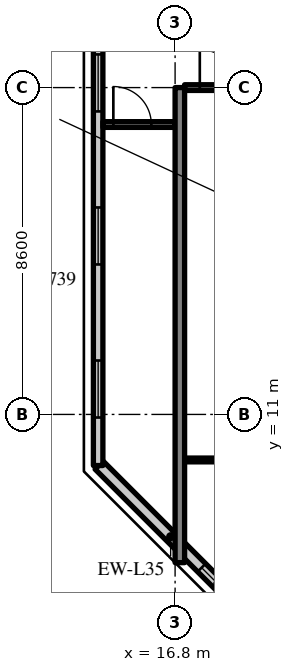
"""IFC4 building model, lengths in metres.
Left out: names, types, materials, properties, quantities, classifications, styles, units other than length and angle.
Written with IfcOpenShell. Run it as: python <this file> out.ifc"""

import sys

from ifc_helpers import new_model, si_unit, direction, frame, frame_2d, origin, place, context, subcontext, project, spatial, rectangle, extrude, source, transform, mapped, element, fill, save


model = new_model("IFC4")
c1 = context("Model", 3, precision=1e-05, world=origin(), true_north=direction((0.0, 1.0)))
c2 = subcontext(c1, "Body", "Model", "MODEL_VIEW")
j1 = project(units=[si_unit("LENGTHUNIT", "METRE"), si_unit("PLANEANGLEUNIT", "RADIAN")], contexts=[c1])
p1 = place(None, origin())
s1 = spatial("IfcSite", under=j1, at=p1, CompositionType="ELEMENT")
p2 = place(p1, origin())
s2 = spatial("IfcBuilding", under=s1, at=p2, CompositionType="ELEMENT")
p3 = place(p2, frame((0.0, 0.0, 281.7)))
s3 = spatial("IfcBuildingStorey", under=s2, at=p3, CompositionType="ELEMENT", Elevation=281.7)
m1 = source(origin(), c2, "Body", "SweptSolid", [
    extrude(rectangle(XDim=12.5, YDim=0.25, at=frame_2d((6.25, 0.0))), origin(), (0.0, 0.0, 1.0), 3.72),
])
p4 = place(p3, frame((16.925, 7.1, 0.0), z_axis=(0.0, 0.0, 1.0), x_axis=(0.0, 1.0, 0.0)))
e1 = element("IfcWall", 1, at=p4, inside=s3, PredefinedType="SHEAR", context=c2, shape_type="MappedRepresentation", body=[
    mapped(m1, transform((0.0, 0.0, 0.0), scale=1.0)),
])
m2 = source(origin(), c2, "Body", "SweptSolid", [
    extrude(rectangle(XDim=5.326, YDim=0.3, at=frame_2d((2.663, 0.0))), origin(), (0.0, 0.0, 1.0), 3.72),
])
p5 = place(p3, frame((14.8, 9.666, 0.0), z_axis=(0.0, 0.0, 1.0), x_axis=(0.707083859269, -0.707129702361, 0.0)))
e2 = element("IfcWall", 2, at=p5, inside=s3, PredefinedType="SOLIDWALL", context=c2, shape_type="MappedRepresentation", body=[
    mapped(m2, transform((0.0, 0.0, 0.0), scale=1.0)),
])
m3 = source(origin(), c2, "Body", "SweptSolid", [
    extrude(rectangle(XDim=1.2, YDim=1.5, at=frame_2d((0.6, 0.75))), frame((0.0, 0.16, 0.0), z_axis=(0.0, -1.0, 0.0), x_axis=(1.0, 0.0, 0.0)), (0.0, 0.0, 1.0), 0.32),
])
p6 = place(p5, frame((3.815, 0.0, 0.9)))
e3 = element("IfcOpeningElement", 3, at=p6, cuts=e2, PredefinedType="OPENING", context=c2, shape_type="MappedRepresentation", body=[
    mapped(m3, transform((0.0, 0.0, 0.0), scale=1.0)),
])
m4 = source(origin(), c2, "Body", "SweptSolid", [
    extrude(rectangle(XDim=28.189, YDim=0.25, at=frame_2d((14.095, 0.0))), origin(), (0.0, 0.0, 1.0), 3.72),
])
p7 = place(p3, frame((14.775, 37.845, 0.0), z_axis=(0.0, 0.0, 1.0), x_axis=(0.0, -1.0, 0.0)))
e4 = element("IfcWall", 4, at=p7, inside=s3, PredefinedType="SOLIDWALL", context=c2, shape_type="MappedRepresentation", body=[
    mapped(m4, transform((0.0, 0.0, 0.0), scale=1.0)),
])
m5 = source(origin(), c2, "Body", "SweptSolid", [
    extrude(rectangle(XDim=1.5, YDim=1.5, at=frame_2d((0.75, 0.75))), frame((0.0, 0.135, 0.0), z_axis=(0.0, -1.0, 0.0), x_axis=(1.0, 0.0, 0.0)), (0.0, 0.0, 1.0), 0.27),
])
p8 = place(p7, frame((1.263, 0.0, 0.9)))
e5 = element("IfcOpeningElement", 5, at=p8, cuts=e4, PredefinedType="OPENING", context=c2, shape_type="MappedRepresentation", body=[
    mapped(m5, transform((0.0, 0.0, 0.0), scale=1.0)),
])
p9 = place(p7, frame((5.291, 0.0, 0.9)))
e6 = element("IfcOpeningElement", 6, at=p9, cuts=e4, PredefinedType="OPENING", context=c2, shape_type="MappedRepresentation", body=[
    mapped(m5, transform((0.0, 0.0, 0.0), scale=1.0)),
])
p10 = place(p7, frame((9.318, 0.0, 0.9)))
e7 = element("IfcOpeningElement", 7, at=p10, cuts=e4, PredefinedType="OPENING", context=c2, shape_type="MappedRepresentation", body=[
    mapped(m5, transform((0.0, 0.0, 0.0), scale=1.0)),
])
p11 = place(p7, frame((13.345, 0.0, 0.9)))
e8 = element("IfcOpeningElement", 8, at=p11, cuts=e4, PredefinedType="OPENING", context=c2, shape_type="MappedRepresentation", body=[
    mapped(m5, transform((0.0, 0.0, 0.0), scale=1.0)),
])
p12 = place(p7, frame((17.372, 0.0, 0.9)))
e9 = element("IfcOpeningElement", 9, at=p12, cuts=e4, PredefinedType="OPENING", context=c2, shape_type="MappedRepresentation", body=[
    mapped(m5, transform((0.0, 0.0, 0.0), scale=1.0)),
])
p13 = place(p7, frame((21.399, 0.0, 0.9)))
e10 = element("IfcOpeningElement", 10, at=p13, cuts=e4, PredefinedType="OPENING", context=c2, shape_type="MappedRepresentation", body=[
    mapped(m5, transform((0.0, 0.0, 0.0), scale=1.0)),
])
p14 = place(p7, frame((25.426, 0.0, 0.9)))
e11 = element("IfcOpeningElement", 11, at=p14, cuts=e4, PredefinedType="OPENING", context=c2, shape_type="MappedRepresentation", body=[
    mapped(m5, transform((0.0, 0.0, 0.0), scale=1.0)),
])
m6 = source(origin(), c2, "Body", "SweptSolid", [
    extrude(rectangle(XDim=8.025, YDim=0.1, at=frame_2d((4.012, 0.0))), origin(), (0.0, 0.0, 1.0), 3.72),
])
p15 = place(p3, frame((17.05, 9.802, 0.0), z_axis=(0.0, 0.0, 1.0), x_axis=(1.0, 0.0, 0.0)))
e12 = element("IfcWall", 12, at=p15, inside=s3, PredefinedType="PARTITIONING", context=c2, shape_type="MappedRepresentation", body=[
    mapped(m6, transform((0.0, 0.0, 0.0), scale=1.0)),
])
m7 = source(origin(), c2, "Body", "SweptSolid", [
    extrude(rectangle(XDim=1.8, YDim=2.1, at=frame_2d((0.9, 1.05))), frame((0.0, 0.06, 0.0), z_axis=(0.0, -1.0, 0.0), x_axis=(1.0, 0.0, 0.0)), (0.0, 0.0, 1.0), 0.12),
])
p16 = place(p15, frame((3.113, 0.0, 0.0)))
e13 = element("IfcOpeningElement", 13, at=p16, cuts=e12, PredefinedType="OPENING", context=c2, shape_type="MappedRepresentation", body=[
    mapped(m7, transform((0.0, 0.0, 0.0), scale=1.0)),
])
m8 = source(origin(), c2, "Body", "SweptSolid", [
    extrude(rectangle(XDim=8.025, YDim=0.15, at=frame_2d((4.012, 0.0))), origin(), (0.0, 0.0, 1.0), 3.02),
])
p17 = place(p3, frame((17.05, 19.6, 0.0), z_axis=(0.0, 0.0, 1.0), x_axis=(1.0, 0.0, 0.0)))
e14 = element("IfcWall", 14, at=p17, inside=s3, PredefinedType="PARTITIONING", context=c2, shape_type="MappedRepresentation", body=[
    mapped(m8, transform((0.0, 0.0, 0.0), scale=1.0)),
])
m9 = source(origin(), c2, "Body", "SweptSolid", [
    extrude(rectangle(XDim=1.0, YDim=2.1, at=frame_2d((0.5, 1.05))), frame((0.0, 0.085, 0.0), z_axis=(0.0, -1.0, 0.0), x_axis=(1.0, 0.0, 0.0)), (0.0, 0.0, 1.0), 0.17),
])
p18 = place(p17, frame((0.4, 0.0, 0.0)))
e15 = element("IfcOpeningElement", 15, at=p18, cuts=e14, PredefinedType="OPENING", context=c2, shape_type="MappedRepresentation", body=[
    mapped(m9, transform((0.0, 0.0, 0.0), scale=1.0)),
])
m10 = source(origin(), c2, "Body", "SweptSolid", [
    extrude(rectangle(XDim=1.9, YDim=0.15, at=frame_2d((0.95, 0.0))), origin(), (0.0, 0.0, 1.0), 3.02),
])
p19 = place(p3, frame((14.9, 18.628, 0.0), z_axis=(0.0, 0.0, 1.0), x_axis=(1.0, 0.0, 0.0)))
e16 = element("IfcWall", 16, at=p19, inside=s3, PredefinedType="PARTITIONING", context=c2, shape_type="MappedRepresentation", body=[
    mapped(m10, transform((0.0, 0.0, 0.0), scale=1.0)),
])
p20 = place(p19, frame((0.275, 0.0, 0.0)))
e17 = element("IfcOpeningElement", 17, at=p20, cuts=e16, PredefinedType="OPENING", context=c2, shape_type="MappedRepresentation", body=[
    mapped(m9, transform((0.0, 0.0, 0.0), scale=1.0)),
])
m11 = source(origin(), c2, "Body", "SweptSolid", [
    extrude(rectangle(XDim=1.2, YDim=1.5, at=frame_2d((0.6, 0.75))), frame((0.0, 0.03, 0.0), z_axis=(0.0, -1.0, 0.0), x_axis=(1.0, 0.0, 0.0)), (0.0, 0.0, 1.0), 0.06),
])
p21 = place(p6, origin())
e18 = element("IfcWindow", 18, at=p21, inside=s3, PartitioningType="SINGLE_PANEL", PredefinedType="WINDOW", context=c2, shape_type="MappedRepresentation", body=[
    mapped(m11, transform((0.0, 0.0, 0.0), scale=1.0)),
])
fill(e3, e18)
m12 = source(origin(), c2, "Body", "SweptSolid", [
    extrude(rectangle(XDim=1.5, YDim=1.5, at=frame_2d((0.75, 0.75))), frame((0.0, 0.03, 0.0), z_axis=(0.0, -1.0, 0.0), x_axis=(1.0, 0.0, 0.0)), (0.0, 0.0, 1.0), 0.06),
])
p22 = place(p12, origin())
e19 = element("IfcWindow", 19, at=p22, inside=s3, PartitioningType="SINGLE_PANEL", PredefinedType="WINDOW", context=c2, shape_type="MappedRepresentation", body=[
    mapped(m12, transform((0.0, 0.0, 0.0), scale=1.0)),
])
fill(e9, e19)
p23 = place(p13, origin())
e20 = element("IfcWindow", 20, at=p23, inside=s3, PartitioningType="SINGLE_PANEL", PredefinedType="WINDOW", context=c2, shape_type="MappedRepresentation", body=[
    mapped(m12, transform((0.0, 0.0, 0.0), scale=1.0)),
])
fill(e10, e20)
p24 = place(p14, origin())
e21 = element("IfcWindow", 21, at=p24, inside=s3, PartitioningType="SINGLE_PANEL", PredefinedType="WINDOW", context=c2, shape_type="MappedRepresentation", body=[
    mapped(m12, transform((0.0, 0.0, 0.0), scale=1.0)),
])
fill(e11, e21)
m13 = source(origin(), c2, "Body", "SweptSolid", [
    extrude(rectangle(XDim=1.0, YDim=2.1, at=frame_2d((0.5, 1.05))), frame((0.0, 0.025, 0.0), z_axis=(0.0, -1.0, 0.0), x_axis=(1.0, 0.0, 0.0)), (0.0, 0.0, 1.0), 0.05),
])
p25 = place(p18, origin())
e22 = element("IfcDoor", 22, at=p25, inside=s3, OperationType="SINGLE_SWING_LEFT", PredefinedType="DOOR", context=c2, shape_type="MappedRepresentation", body=[
    mapped(m13, transform((0.0, 0.0, 0.0), scale=1.0)),
])
fill(e15, e22)
p26 = place(p20, origin())
e23 = element("IfcDoor", 23, at=p26, inside=s3, OperationType="SINGLE_SWING_LEFT", PredefinedType="DOOR", context=c2, shape_type="MappedRepresentation", body=[
    mapped(m13, transform((0.0, 0.0, 0.0), scale=1.0)),
])
fill(e17, e23)
save(model, sys.argv[1])
